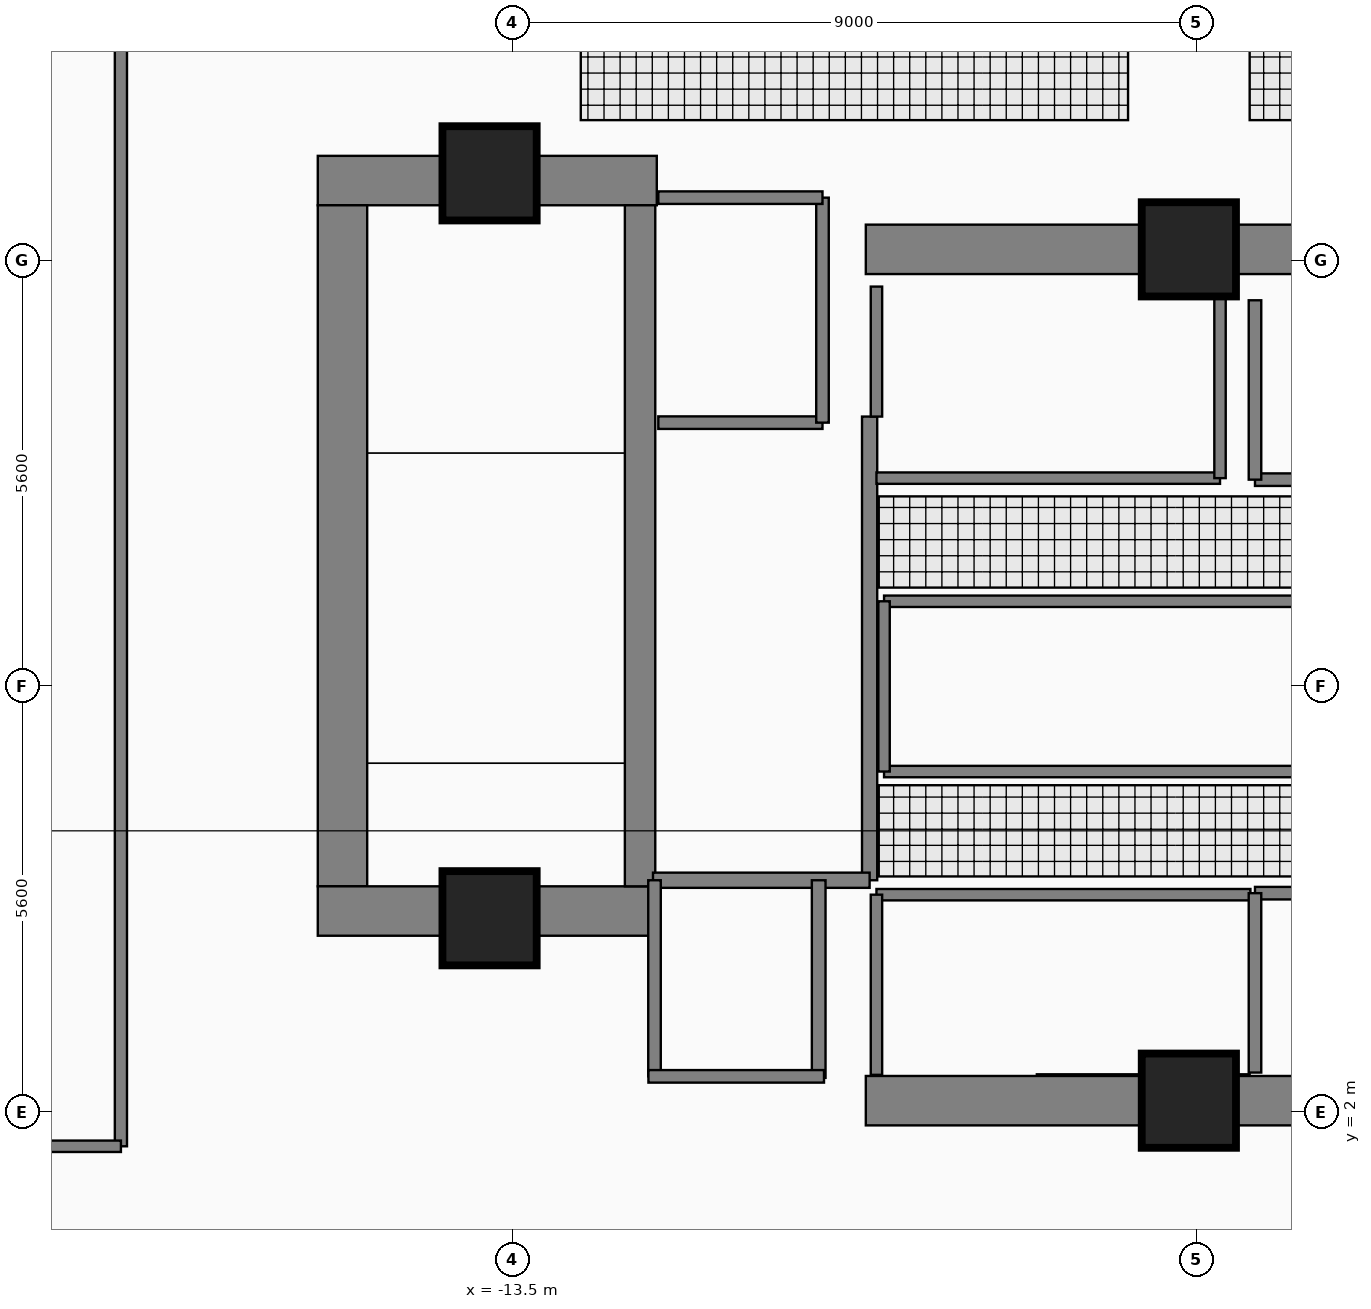
"""IFC4 building model, lengths in metres.
Left out: names, types, materials, properties, quantities, classifications, styles, units other than length and angle.
Written with IfcOpenShell. Run it as: python <this file> out.ifc"""

import sys

from ifc_helpers import new_model, si_unit, direction, frame, frame_2d, origin, origin_2d, place, context, subcontext, project, spatial, rectangle, extrude, element, fill, save


model = new_model("IFC4")
c1 = context("Model", 3, precision=1e-05, world=origin(), true_north=direction((0.0, 1.0)))
c2 = subcontext(c1, "Body", "Model", "MODEL_VIEW")
j1 = project(units=[si_unit("LENGTHUNIT", "METRE"), si_unit("PLANEANGLEUNIT", "RADIAN")], contexts=[c1])
p1 = place(None, origin())
s1 = spatial("IfcSite", under=j1, at=p1, CompositionType="ELEMENT")
p2 = place(p1, origin())
s2 = spatial("IfcBuilding", under=s1, at=p2, CompositionType="ELEMENT")
p3 = place(p2, frame((0.0, 0.0, 168.2)))
s3 = spatial("IfcBuildingStorey", under=s2, at=p3, CompositionType="ELEMENT", Elevation=168.2)
p4 = place(p3, frame((-16.06, 14.255, 0.0), z_axis=(0.0, 0.0, 1.0), x_axis=(1.0, 0.0, 0.0)))
e1 = element("IfcWall", 1, at=p4, inside=s3, PredefinedType="SHEAR", context=c2, shape_type="SweptSolid", body=[
    extrude(rectangle(XDim=4.46, YDim=0.65, at=frame_2d((2.23, 0.0))), origin(), (0.0, 0.0, 1.0), 4.41),
])
p5 = place(p3, frame((-15.735, 4.97, 0.0), z_axis=(0.0, 0.0, 1.0), x_axis=(0.0, 1.0, 0.0)))
e2 = element("IfcWall", 2, at=p5, inside=s3, PredefinedType="SHEAR", context=c2, shape_type="SweptSolid", body=[
    extrude(rectangle(XDim=8.96, YDim=0.65, at=frame_2d((4.48, 0.0))), origin(), (0.0, 0.0, 1.0), 4.41),
])
p6 = place(p3, frame((-16.06, 4.645, 0.0), z_axis=(0.0, 0.0, 1.0), x_axis=(1.0, 0.0, 0.0)))
e3 = element("IfcWall", 3, at=p6, inside=s3, PredefinedType="SHEAR", context=c2, shape_type="SweptSolid", body=[
    extrude(rectangle(XDim=4.46, YDim=0.65, at=frame_2d((2.23, 0.0))), origin(), (0.0, 0.0, 1.0), 4.41),
])
for number, where, z_axis, x_axis in (
    (4, (-8.85, 2.15, 0.0), (0.0, 0.0, 1.0), (1.0, 0.0, 0.0)),
    (5, (-8.85, 13.35, 0.0), (0.0, 0.0, 1.0), (1.0, 0.0, 0.0)),
):
    element("IfcWall", number, at=place(p3, frame(where, z_axis=z_axis, x_axis=x_axis)), inside=s3, PredefinedType="SHEAR", context=c2, shape_type="SweptSolid", body=[
        extrude(rectangle(XDim=7.6, YDim=0.65, at=frame_2d((3.8, 0.0))), origin(), (0.0, 0.0, 1.0), 4.38),
    ])
p7 = place(p3, frame((-11.82, 4.97, 0.0), z_axis=(0.0, 0.0, 1.0), x_axis=(0.0, 1.0, 0.0)))
e6 = element("IfcWall", 6, at=p7, inside=s3, PredefinedType="SHEAR", context=c2, shape_type="SweptSolid", body=[
    extrude(rectangle(XDim=8.96, YDim=0.4, at=frame_2d((4.48, 0.0))), origin(), (0.0, 0.0, 1.0), 4.41),
])
p8 = place(p7, frame((0.31, 0.0, 0.0)))
e7 = element("IfcOpeningElement", 7, at=p8, cuts=e6, PredefinedType="OPENING", context=c2, shape_type="SweptSolid", body=[
    extrude(rectangle(XDim=1.12, YDim=2.22, at=frame_2d((0.56, 1.11))), frame((0.0, 0.21, 0.0), z_axis=(0.0, -1.0, 0.0), x_axis=(1.0, 0.0, 0.0)), (0.0, 0.0, 1.0), 0.42),
])
for number, where, z_axis, x_axis in (
    (8, (-13.8, 14.35, 0.0), (0.0, 0.0, 1.0), (1.0, 0.0, 0.0)),
    (9, (-4.6, 13.35, 0.0), (0.0, 0.0, 1.0), (1.0, 0.0, 0.0)),
    (10, (-13.8, 4.55, 0.0), (0.0, 0.0, 1.0), (1.0, 0.0, 0.0)),
    (11, (-4.6, 2.15, 0.0), (0.0, 0.0, 1.0), (1.0, 0.0, 0.0)),
):
    element("IfcColumn", number, at=place(p3, frame(where, z_axis=z_axis, x_axis=x_axis)), inside=s3, PredefinedType="COLUMN", context=c2, shape_type="SweptSolid", body=[
        extrude(rectangle(XDim=1.2, YDim=1.2, at=origin_2d()), origin(), (0.0, 0.0, 1.0), 4.6),
    ])
p9 = place(p3, frame((-8.8, 5.05, 0.0), z_axis=(0.0, 0.0, 1.0), x_axis=(0.0, 1.0, 0.0)))
e12 = element("IfcWall", 12, at=p9, inside=s3, PredefinedType="PARTITIONING", context=c2, shape_type="SweptSolid", body=[
    extrude(rectangle(XDim=6.1, YDim=0.2, at=frame_2d((3.05, 0.0))), origin(), (0.0, 0.0, 1.0), 4.38),
])
p10 = place(p9, frame((0.25, 0.0, 0.0)))
e13 = element("IfcOpeningElement", 13, at=p10, cuts=e12, PredefinedType="OPENING", context=c2, shape_type="SweptSolid", body=[
    extrude(rectangle(XDim=1.1, YDim=2.2, at=frame_2d((0.55, 1.1))), frame((0.0, 0.11, 0.0), z_axis=(0.0, -1.0, 0.0), x_axis=(1.0, 0.0, 0.0)), (0.0, 0.0, 1.0), 0.22),
])
p11 = place(p9, frame((3.85, 0.0, 0.0)))
e14 = element("IfcOpeningElement", 14, at=p11, cuts=e12, PredefinedType="OPENING", context=c2, shape_type="SweptSolid", body=[
    extrude(rectangle(XDim=1.1, YDim=2.2, at=frame_2d((0.55, 1.1))), frame((0.0, 0.11, 0.0), z_axis=(0.0, -1.0, 0.0), x_axis=(1.0, 0.0, 0.0)), (0.0, 0.0, 1.0), 0.22),
])
p12 = place(p3, frame((-11.58, 11.07, 0.0), z_axis=(0.0, 0.0, 1.0), x_axis=(1.0, 0.0, 0.0)))
e15 = element("IfcWall", 15, at=p12, inside=s3, PredefinedType="PARTITIONING", context=c2, shape_type="SweptSolid", body=[
    extrude(rectangle(XDim=2.16, YDim=0.165, at=frame_2d((1.08, 0.0))), origin(), (0.0, 0.0, 1.0), 4.38),
])
p13 = place(p12, frame((0.53, 0.0, 0.0)))
e16 = element("IfcOpeningElement", 16, at=p13, cuts=e15, PredefinedType="OPENING", context=c2, shape_type="SweptSolid", body=[
    extrude(rectangle(XDim=1.15, YDim=2.25, at=frame_2d((0.575, 1.125))), frame((0.0, 0.093, 0.0), z_axis=(0.0, -1.0, 0.0), x_axis=(1.0, 0.0, 0.0)), (0.0, 0.0, 1.0), 0.185),
])
p14 = place(p3, frame((-3.73, 4.88, 0.0), z_axis=(0.0, 0.0, 1.0), x_axis=(1.0, 0.0, 0.0)))
e17 = element("IfcWall", 17, at=p14, inside=s3, PredefinedType="PARTITIONING", context=c2, shape_type="SweptSolid", body=[
    extrude(rectangle(XDim=2.46, YDim=0.165, at=frame_2d((1.23, 0.0))), origin(), (0.0, 0.0, 1.0), 4.38),
])
p15 = place(p14, frame((0.68, 0.0, 0.0)))
e18 = element("IfcOpeningElement", 18, at=p15, cuts=e17, PredefinedType="OPENING", context=c2, shape_type="SweptSolid", body=[
    extrude(rectangle(XDim=1.1, YDim=2.25, at=frame_2d((0.55, 1.125))), frame((0.0, 0.093, 0.0), z_axis=(0.0, -1.0, 0.0), x_axis=(1.0, 0.0, 0.0)), (0.0, 0.0, 1.0), 0.185),
])
p16 = place(p3, frame((-3.73, 10.32, 0.0), z_axis=(0.0, 0.0, 1.0), x_axis=(1.0, 0.0, 0.0)))
e19 = element("IfcWall", 19, at=p16, inside=s3, PredefinedType="PARTITIONING", context=c2, shape_type="SweptSolid", body=[
    extrude(rectangle(XDim=2.46, YDim=0.165, at=frame_2d((1.23, 0.0))), origin(), (0.0, 0.0, 1.0), 4.38),
])
p17 = place(p16, frame((0.68, 0.0, 0.0)))
e20 = element("IfcOpeningElement", 20, at=p17, cuts=e19, PredefinedType="OPENING", context=c2, shape_type="SweptSolid", body=[
    extrude(rectangle(XDim=1.1, YDim=2.25, at=frame_2d((0.55, 1.125))), frame((0.0, 0.093, 0.0), z_axis=(0.0, -1.0, 0.0), x_axis=(1.0, 0.0, 0.0)), (0.0, 0.0, 1.0), 0.185),
])
p18 = place(p3, frame((-8.71, 4.86, 0.0), z_axis=(0.0, 0.0, 1.0), x_axis=(1.0, 0.0, 0.0)))
e21 = element("IfcWall", 21, at=p18, inside=s3, PredefinedType="PARTITIONING", context=c2, shape_type="SweptSolid", body=[
    extrude(rectangle(XDim=4.92, YDim=0.15, at=frame_2d((2.46, 0.0))), origin(), (0.0, 0.0, 1.0), 4.38),
])
p19 = place(p18, frame((2.01, 0.0, 0.0)))
e22 = element("IfcOpeningElement", 22, at=p19, cuts=e21, PredefinedType="OPENING", context=c2, shape_type="SweptSolid", body=[
    extrude(rectangle(XDim=0.9, YDim=2.15, at=frame_2d((0.45, 1.075))), frame((0.0, 0.085, 0.0), z_axis=(0.0, -1.0, 0.0), x_axis=(1.0, 0.0, 0.0)), (0.0, 0.0, 1.0), 0.17),
])
p20 = place(p3, frame((-8.71, 10.34, 0.0), z_axis=(0.0, 0.0, 1.0), x_axis=(1.0, 0.0, 0.0)))
e23 = element("IfcWall", 23, at=p20, inside=s3, PredefinedType="PARTITIONING", context=c2, shape_type="SweptSolid", body=[
    extrude(rectangle(XDim=4.52, YDim=0.15, at=frame_2d((2.26, 0.0))), origin(), (0.0, 0.0, 1.0), 4.38),
])
p21 = place(p20, frame((1.81, 0.0, 0.0)))
e24 = element("IfcOpeningElement", 24, at=p21, cuts=e23, PredefinedType="OPENING", context=c2, shape_type="SweptSolid", body=[
    extrude(rectangle(XDim=0.9, YDim=2.15, at=frame_2d((0.45, 1.075))), frame((0.0, 0.085, 0.0), z_axis=(0.0, -1.0, 0.0), x_axis=(1.0, 0.0, 0.0)), (0.0, 0.0, 1.0), 0.17),
])
p22 = place(p3, frame((-8.61, 6.48, 0.0), z_axis=(0.0, 0.0, 1.0), x_axis=(1.0, 0.0, 0.0)))
e25 = element("IfcWall", 25, at=p22, inside=s3, PredefinedType="PARTITIONING", context=c2, shape_type="SweptSolid", body=[
    extrude(rectangle(XDim=7.29, YDim=0.15, at=frame_2d((3.645, 0.0))), origin(), (0.0, 0.0, 1.0), 4.38),
])
p23 = place(p22, frame((3.195, 0.0, 0.0)))
e26 = element("IfcOpeningElement", 26, at=p23, cuts=e25, PredefinedType="OPENING", context=c2, shape_type="SweptSolid", body=[
    extrude(rectangle(XDim=0.9, YDim=2.15, at=frame_2d((0.45, 1.075))), frame((0.0, 0.085, 0.0), z_axis=(0.0, -1.0, 0.0), x_axis=(1.0, 0.0, 0.0)), (0.0, 0.0, 1.0), 0.17),
])
p24 = place(p3, frame((-18.65, 1.55, 0.0), z_axis=(0.0, 0.0, 1.0), x_axis=(0.0, 1.0, 0.0)))
e27 = element("IfcWall", 27, at=p24, inside=s3, PredefinedType="PARTITIONING", context=c2, shape_type="SweptSolid", body=[
    extrude(rectangle(XDim=15.05, YDim=0.16, at=frame_2d((7.525, 0.0))), origin(), (0.0, 0.0, 1.0), 4.38),
])
p25 = place(p24, frame((6.985, 0.0, 0.0)))
e28 = element("IfcOpeningElement", 28, at=p25, cuts=e27, PredefinedType="OPENING", context=c2, shape_type="SweptSolid", body=[
    extrude(rectangle(XDim=1.08, YDim=2.18, at=frame_2d((0.54, 1.09))), frame((0.0, 0.09, 0.0), z_axis=(0.0, -1.0, 0.0), x_axis=(1.0, 0.0, 0.0)), (0.0, 0.0, 1.0), 0.18),
])
p26 = place(p3, frame((-11.65, 5.05, 0.0), z_axis=(0.0, 0.0, 1.0), x_axis=(1.0, 0.0, 0.0)))
e29 = element("IfcWall", 29, at=p26, inside=s3, PredefinedType="PARTITIONING", context=c2, shape_type="SweptSolid", body=[
    extrude(rectangle(XDim=2.85, YDim=0.2, at=frame_2d((1.425, 0.0))), origin(), (0.0, 0.0, 1.0), 4.38),
])
p27 = place(p3, frame((-9.42, 11.07, 0.0), z_axis=(0.0, 0.0, 1.0), x_axis=(0.0, 1.0, 0.0)))
e30 = element("IfcWall", 30, at=p27, inside=s3, PredefinedType="PARTITIONING", context=c2, shape_type="SweptSolid", body=[
    extrude(rectangle(XDim=2.96, YDim=0.165, at=frame_2d((1.48, 0.0))), origin(), (0.0, 0.0, 1.0), 4.38),
])
p28 = place(p3, frame((-11.58, 14.03, 0.0), z_axis=(0.0, 0.0, 1.0), x_axis=(1.0, 0.0, 0.0)))
e31 = element("IfcWall", 31, at=p28, inside=s3, PredefinedType="PARTITIONING", context=c2, shape_type="SweptSolid", body=[
    extrude(rectangle(XDim=2.16, YDim=0.165, at=frame_2d((1.08, 0.0))), origin(), (0.0, 0.0, 1.0), 4.38),
])
for number, where, z_axis, x_axis in (
    (32, (-3.73, 2.52, 0.0), (0.0, 0.0, 1.0), (0.0, 1.0, 0.0)),
    (33, (-3.73, 10.32, 0.0), (0.0, 0.0, 1.0), (0.0, 1.0, 0.0)),
):
    element("IfcWall", number, at=place(p3, frame(where, z_axis=z_axis, x_axis=x_axis)), inside=s3, PredefinedType="PARTITIONING", context=c2, shape_type="SweptSolid", body=[
        extrude(rectangle(XDim=2.36, YDim=0.165, at=frame_2d((1.18, 0.0))), origin(), (0.0, 0.0, 1.0), 4.38),
    ])
p29 = place(p3, frame((-8.71, 2.49, 0.0), z_axis=(0.0, 0.0, 1.0), x_axis=(0.0, 1.0, 0.0)))
e34 = element("IfcWall", 34, at=p29, inside=s3, PredefinedType="PARTITIONING", context=c2, shape_type="SweptSolid", body=[
    extrude(rectangle(XDim=2.37, YDim=0.15, at=frame_2d((1.185, 0.0))), origin(), (0.0, 0.0, 1.0), 4.38),
])
p30 = place(p3, frame((-8.71, 11.15, 0.0), z_axis=(0.0, 0.0, 1.0), x_axis=(0.0, 1.0, 0.0)))
e35 = element("IfcWall", 35, at=p30, inside=s3, PredefinedType="PARTITIONING", context=c2, shape_type="SweptSolid", body=[
    extrude(rectangle(XDim=1.71, YDim=0.15, at=frame_2d((0.855, 0.0))), origin(), (0.0, 0.0, 1.0), 4.38),
])
p31 = place(p3, frame((-4.19, 10.34, 0.0), z_axis=(0.0, 0.0, 1.0), x_axis=(0.0, 1.0, 0.0)))
e36 = element("IfcWall", 36, at=p31, inside=s3, PredefinedType="PARTITIONING", context=c2, shape_type="SweptSolid", body=[
    extrude(rectangle(XDim=2.52, YDim=0.15, at=frame_2d((1.26, 0.0))), origin(), (0.0, 0.0, 1.0), 4.38),
])
p32 = place(p3, frame((-9.47, 2.45, 0.0), z_axis=(0.0, 0.0, 1.0), x_axis=(0.0, 1.0, 0.0)))
e37 = element("IfcWall", 37, at=p32, inside=s3, PredefinedType="PARTITIONING", context=c2, shape_type="SweptSolid", body=[
    extrude(rectangle(XDim=2.6, YDim=0.18, at=frame_2d((1.3, 0.0))), origin(), (0.0, 0.0, 1.0), 4.38),
])
p33 = place(p3, frame((-11.63, 2.47, 0.0), z_axis=(0.0, 0.0, 1.0), x_axis=(0.0, 1.0, 0.0)))
e38 = element("IfcWall", 38, at=p33, inside=s3, PredefinedType="PARTITIONING", context=c2, shape_type="SweptSolid", body=[
    extrude(rectangle(XDim=2.58, YDim=0.165, at=frame_2d((1.29, 0.0))), origin(), (0.0, 0.0, 1.0), 4.38),
])
p34 = place(p3, frame((-11.71, 2.47, 0.0), z_axis=(0.0, 0.0, 1.0), x_axis=(1.0, 0.0, 0.0)))
e39 = element("IfcWall", 39, at=p34, inside=s3, PredefinedType="PARTITIONING", context=c2, shape_type="SweptSolid", body=[
    extrude(rectangle(XDim=2.31, YDim=0.165, at=frame_2d((1.155, 0.0))), origin(), (0.0, 0.0, 1.0), 3.28),
])
p35 = place(p3, frame((-8.61, 8.72, 0.0), z_axis=(0.0, 0.0, 1.0), x_axis=(1.0, 0.0, 0.0)))
e40 = element("IfcWall", 40, at=p35, inside=s3, PredefinedType="PARTITIONING", context=c2, shape_type="SweptSolid", body=[
    extrude(rectangle(XDim=7.29, YDim=0.15, at=frame_2d((3.645, 0.0))), origin(), (0.0, 0.0, 1.0), 4.38),
])
p36 = place(p3, frame((-8.61, 6.48, 0.0), z_axis=(0.0, 0.0, 1.0), x_axis=(0.0, 1.0, 0.0)))
e41 = element("IfcWall", 41, at=p36, inside=s3, PredefinedType="PARTITIONING", context=c2, shape_type="SweptSolid", body=[
    extrude(rectangle(XDim=2.24, YDim=0.15, at=frame_2d((1.12, 0.0))), origin(), (0.0, 0.0, 1.0), 4.38),
])
p37 = place(p3, frame((-22.04, 1.55, 0.0), z_axis=(0.0, 0.0, 1.0), x_axis=(1.0, 0.0, 0.0)))
e42 = element("IfcWall", 42, at=p37, inside=s3, PredefinedType="PARTITIONING", context=c2, shape_type="SweptSolid", body=[
    extrude(rectangle(XDim=3.39, YDim=0.15, at=frame_2d((1.695, 0.0))), origin(), (0.0, 0.0, 1.0), 4.38),
])
p38 = place(p8, origin())
e43 = element("IfcDoor", 43, at=p38, inside=s3, OperationType="SINGLE_SWING_LEFT", PredefinedType="DOOR", context=c2, shape_type="SweptSolid", body=[
    extrude(rectangle(XDim=1.12, YDim=2.22, at=frame_2d((0.56, 1.11))), frame((0.0, 0.025, 0.0), z_axis=(0.0, -1.0, 0.0), x_axis=(1.0, 0.0, 0.0)), (0.0, 0.0, 1.0), 0.05),
])
fill(e7, e43)
p39 = place(p10, origin())
e44 = element("IfcDoor", 44, at=p39, inside=s3, OperationType="SINGLE_SWING_LEFT", PredefinedType="DOOR", context=c2, shape_type="SweptSolid", body=[
    extrude(rectangle(XDim=1.1, YDim=2.2, at=frame_2d((0.55, 1.1))), frame((0.0, 0.025, 0.0), z_axis=(0.0, -1.0, 0.0), x_axis=(1.0, 0.0, 0.0)), (0.0, 0.0, 1.0), 0.05),
])
fill(e13, e44)
p40 = place(p11, origin())
e45 = element("IfcDoor", 45, at=p40, inside=s3, OperationType="SINGLE_SWING_RIGHT", PredefinedType="DOOR", context=c2, shape_type="SweptSolid", body=[
    extrude(rectangle(XDim=1.1, YDim=2.2, at=frame_2d((0.55, 1.1))), frame((0.0, 0.025, 0.0), z_axis=(0.0, -1.0, 0.0), x_axis=(1.0, 0.0, 0.0)), (0.0, 0.0, 1.0), 0.05),
])
fill(e14, e45)
p41 = place(p13, origin())
e46 = element("IfcDoor", 46, at=p41, inside=s3, OperationType="SLIDING_TO_LEFT", PredefinedType="DOOR", context=c2, shape_type="SweptSolid", body=[
    extrude(rectangle(XDim=1.15, YDim=2.25, at=frame_2d((0.575, 1.125))), frame((0.0, 0.025, 0.0), z_axis=(0.0, -1.0, 0.0), x_axis=(1.0, 0.0, 0.0)), (0.0, 0.0, 1.0), 0.05),
])
fill(e16, e46)
p42 = place(p19, origin())
e47 = element("IfcDoor", 47, at=p42, inside=s3, OperationType="SINGLE_SWING_LEFT", PredefinedType="DOOR", context=c2, shape_type="SweptSolid", body=[
    extrude(rectangle(XDim=0.9, YDim=2.15, at=frame_2d((0.45, 1.075))), frame((0.0, 0.025, 0.0), z_axis=(0.0, -1.0, 0.0), x_axis=(1.0, 0.0, 0.0)), (0.0, 0.0, 1.0), 0.05),
])
fill(e22, e47)
p43 = place(p21, origin())
e48 = element("IfcDoor", 48, at=p43, inside=s3, OperationType="SINGLE_SWING_RIGHT", PredefinedType="DOOR", context=c2, shape_type="SweptSolid", body=[
    extrude(rectangle(XDim=0.9, YDim=2.15, at=frame_2d((0.45, 1.075))), frame((0.0, 0.025, 0.0), z_axis=(0.0, -1.0, 0.0), x_axis=(1.0, 0.0, 0.0)), (0.0, 0.0, 1.0), 0.05),
])
fill(e24, e48)
p44 = place(p23, origin())
e49 = element("IfcDoor", 49, at=p44, inside=s3, OperationType="SINGLE_SWING_LEFT", PredefinedType="DOOR", context=c2, shape_type="SweptSolid", body=[
    extrude(rectangle(XDim=0.9, YDim=2.15, at=frame_2d((0.45, 1.075))), frame((0.0, 0.025, 0.0), z_axis=(0.0, -1.0, 0.0), x_axis=(1.0, 0.0, 0.0)), (0.0, 0.0, 1.0), 0.05),
])
fill(e26, e49)
p45 = place(p25, origin())
e50 = element("IfcDoor", 50, at=p45, inside=s3, OperationType="SINGLE_SWING_LEFT", PredefinedType="DOOR", context=c2, shape_type="SweptSolid", body=[
    extrude(rectangle(XDim=1.08, YDim=2.18, at=frame_2d((0.54, 1.09))), frame((0.0, 0.025, 0.0), z_axis=(0.0, -1.0, 0.0), x_axis=(1.0, 0.0, 0.0)), (0.0, 0.0, 1.0), 0.05),
])
fill(e28, e50)
save(model, sys.argv[1])
